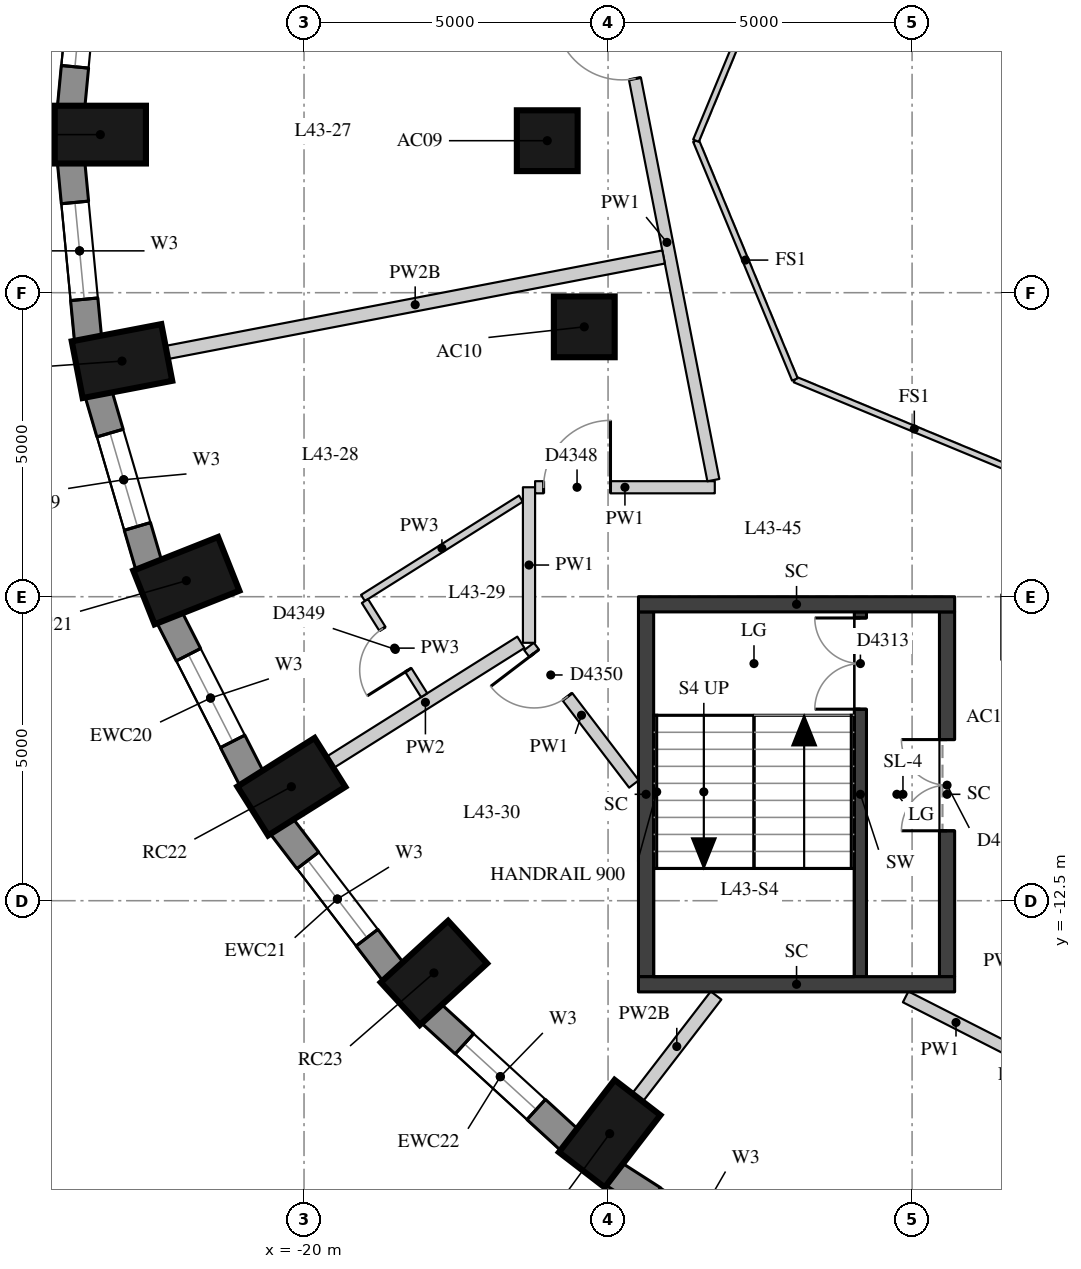
"""IFC4 building model, lengths in metres.
Left out: names, types, materials, properties, quantities, classifications, styles, units other than length and angle.
Written with IfcOpenShell. Run it as: python <this file> out.ifc"""

import sys

from ifc_helpers import new_model, si_unit, direction, frame, frame_2d, origin, origin_2d, place, context, subcontext, project, spatial, rectangle, extrude, element, fill, save


model = new_model("IFC4")
c1 = context("Model", 3, precision=1e-05, world=origin(), true_north=direction((0.0, 1.0)))
c2 = subcontext(c1, "Body", "Model", "MODEL_VIEW")
j1 = project(units=[si_unit("LENGTHUNIT", "METRE"), si_unit("PLANEANGLEUNIT", "RADIAN")], contexts=[c1])
p1 = place(None, origin())
s1 = spatial("IfcSite", under=j1, at=p1, CompositionType="ELEMENT")
p2 = place(p1, origin())
s2 = spatial("IfcBuilding", under=s1, at=p2, CompositionType="ELEMENT")
p3 = place(p2, frame((0.0, 0.0, 155.0)))
s3 = spatial("IfcBuildingStorey", under=s2, at=p3, CompositionType="ELEMENT", Elevation=155.0)
for number, where, z_axis, x_axis in (
    (1, (-23.35, 0.1, 0.0), (0.0, 0.0, 1.0), (-1.0, 0.0, 0.0)),
    (2, (-22.994, -3.625, 0.0), (0.0, 0.0, 1.0), (-0.982, -0.189, 0.0)),
    (3, (-21.936, -7.236, 0.0), (0.0, 0.0, 1.0), (-0.93, -0.369, 0.0)),
    (4, (-20.208, -10.625, 0.0), (0.0, 0.0, 1.0), (-0.846, -0.533, 0.0)),
    (5, (-17.864, -13.688, 0.0), (0.0, 0.0, 1.0), (-0.738, -0.675, 0.0)),
    (6, (-14.973, -16.332, 0.0), (0.0, 0.0, 1.0), (-0.61, -0.792, 0.0)),
):
    element("IfcColumn", number, at=place(p3, frame(where, z_axis=z_axis, x_axis=x_axis)), inside=s3, PredefinedType="COLUMN", context=c2, shape_type="SweptSolid", body=[
        extrude(rectangle(XDim=1.5, YDim=0.95, at=origin_2d()), origin(), (0.0, 0.0, 1.0), 3.3),
    ])
for number, where, z_axis, x_axis in (
    (7, (-16.0, 0.0, 0.0), (0.0, 0.0, 1.0), (1.0, 0.0, 0.0)),
    (8, (-15.391, -3.062, 0.0), (0.0, 0.0, 1.0), (1.0, 0.0, 0.0)),
):
    element("IfcColumn", number, at=place(p3, frame(where, z_axis=z_axis, x_axis=x_axis)), inside=s3, PredefinedType="COLUMN", context=c2, shape_type="SweptSolid", body=[
        extrude(rectangle(XDim=1.0, YDim=1.0, at=origin_2d()), origin(), (0.0, 0.0, 1.0), 3.3),
    ])
p4 = place(p3, frame((-23.552, 3.469, 0.0), z_axis=(0.0, 0.0, 1.0), x_axis=(-0.095265737322, -0.995451876935, 0.0)))
e9 = element("IfcWall", 9, at=p4, inside=s3, PredefinedType="SOLIDWALL", context=c2, shape_type="SweptSolid", body=[
    extrude(rectangle(XDim=2.927, YDim=0.45, at=frame_2d((1.463, 0.0))), origin(), (0.0, 0.0, 1.0), 3.02),
])
p5 = place(p4, frame((0.663, 0.0, 0.4)))
e10 = element("IfcOpeningElement", 10, at=p5, cuts=e9, PredefinedType="OPENING", context=c2, shape_type="SweptSolid", body=[
    extrude(rectangle(XDim=1.6, YDim=1.75, at=frame_2d((0.8, 0.875))), frame((0.0, 0.235, 0.0), z_axis=(0.0, -1.0, 0.0), x_axis=(1.0, 0.0, 0.0)), (0.0, 0.0, 1.0), 0.47),
])
p6 = place(p3, frame((-23.831, -0.355, 0.0), z_axis=(0.0, 0.0, 1.0), x_axis=(0.095257827044, -0.995452633924, 0.0)))
e11 = element("IfcWall", 11, at=p6, inside=s3, PredefinedType="SOLIDWALL", context=c2, shape_type="SweptSolid", body=[
    extrude(rectangle(XDim=2.927, YDim=0.45, at=frame_2d((1.463, 0.0))), origin(), (0.0, 0.0, 1.0), 3.02),
])
p7 = place(p6, frame((0.663, 0.0, 0.4)))
e12 = element("IfcOpeningElement", 12, at=p7, cuts=e11, PredefinedType="OPENING", context=c2, shape_type="SweptSolid", body=[
    extrude(rectangle(XDim=1.6, YDim=1.75, at=frame_2d((0.8, 0.875))), frame((0.0, 0.235, 0.0), z_axis=(0.0, -1.0, 0.0), x_axis=(1.0, 0.0, 0.0)), (0.0, 0.0, 1.0), 0.47),
])
p8 = place(p3, frame((-23.38, -4.162, 0.0), z_axis=(0.0, 0.0, 1.0), x_axis=(0.281125768296, -0.959670934435, 0.0)))
e13 = element("IfcWall", 13, at=p8, inside=s3, PredefinedType="SOLIDWALL", context=c2, shape_type="SweptSolid", body=[
    extrude(rectangle(XDim=2.948, YDim=0.45, at=frame_2d((1.474, 0.0))), origin(), (0.0, 0.0, 1.0), 3.02),
])
p9 = place(p8, frame((0.674, 0.0, 0.4)))
e14 = element("IfcOpeningElement", 14, at=p9, cuts=e13, PredefinedType="OPENING", context=c2, shape_type="SweptSolid", body=[
    extrude(rectangle(XDim=1.6, YDim=1.75, at=frame_2d((0.8, 0.875))), frame((0.0, 0.235, 0.0), z_axis=(0.0, -1.0, 0.0), x_axis=(1.0, 0.0, 0.0)), (0.0, 0.0, 1.0), 0.47),
])
p10 = place(p3, frame((-22.215, -7.837, 0.0), z_axis=(0.0, 0.0, 1.0), x_axis=(0.454133999889, -0.890933392653, 0.0)))
e15 = element("IfcWall", 15, at=p10, inside=s3, PredefinedType="SOLIDWALL", context=c2, shape_type="SweptSolid", body=[
    extrude(rectangle(XDim=2.986, YDim=0.45, at=frame_2d((1.493, 0.0))), origin(), (0.0, 0.0, 1.0), 3.02),
])
p11 = place(p10, frame((0.693, 0.0, 0.4)))
e16 = element("IfcOpeningElement", 16, at=p11, cuts=e15, PredefinedType="OPENING", context=c2, shape_type="SweptSolid", body=[
    extrude(rectangle(XDim=1.6, YDim=1.75, at=frame_2d((0.8, 0.875))), frame((0.0, 0.235, 0.0), z_axis=(0.0, -1.0, 0.0), x_axis=(1.0, 0.0, 0.0)), (0.0, 0.0, 1.0), 0.47),
])
p12 = place(p3, frame((-20.374, -11.267, 0.0), z_axis=(0.0, 0.0, 1.0), x_axis=(0.607817056371, -0.794077090706, 0.0)))
e17 = element("IfcWall", 17, at=p12, inside=s3, PredefinedType="SOLIDWALL", context=c2, shape_type="SweptSolid", body=[
    extrude(rectangle(XDim=3.037, YDim=0.45, at=frame_2d((1.519, 0.0))), origin(), (0.0, 0.0, 1.0), 3.02),
])
p13 = place(p12, frame((0.719, 0.0, 0.4)))
e18 = element("IfcOpeningElement", 18, at=p13, cuts=e17, PredefinedType="OPENING", context=c2, shape_type="SweptSolid", body=[
    extrude(rectangle(XDim=1.6, YDim=1.75, at=frame_2d((0.8, 0.875))), frame((0.0, 0.235, 0.0), z_axis=(0.0, -1.0, 0.0), x_axis=(1.0, 0.0, 0.0)), (0.0, 0.0, 1.0), 0.47),
])
p14 = place(p3, frame((-17.913, -14.35, 0.0), z_axis=(0.0, 0.0, 1.0), x_axis=(0.737808755941, -0.675009807082, 0.0)))
e19 = element("IfcWall", 19, at=p14, inside=s3, PredefinedType="SOLIDWALL", context=c2, shape_type="SweptSolid", body=[
    extrude(rectangle(XDim=3.094, YDim=0.45, at=frame_2d((1.547, 0.0))), origin(), (0.0, 0.0, 1.0), 3.02),
])
p15 = place(p14, frame((0.747, 0.0, 0.4)))
e20 = element("IfcOpeningElement", 20, at=p15, cuts=e19, PredefinedType="OPENING", context=c2, shape_type="SweptSolid", body=[
    extrude(rectangle(XDim=1.6, YDim=1.75, at=frame_2d((0.8, 0.875))), frame((0.0, 0.235, 0.0), z_axis=(0.0, -1.0, 0.0), x_axis=(1.0, 0.0, 0.0)), (0.0, 0.0, 1.0), 0.47),
])
p16 = place(p3, frame((-14.908, -16.993, 0.0), z_axis=(0.0, 0.0, 1.0), x_axis=(0.842065914439, -0.539374633943, 0.0)))
e21 = element("IfcWall", 21, at=p16, inside=s3, PredefinedType="SOLIDWALL", context=c2, shape_type="SweptSolid", body=[
    extrude(rectangle(XDim=3.151, YDim=0.45, at=frame_2d((1.576, 0.0))), origin(), (0.0, 0.0, 1.0), 3.02),
])
p17 = place(p16, frame((0.776, 0.0, 0.4)))
e22 = element("IfcOpeningElement", 22, at=p17, cuts=e21, PredefinedType="OPENING", context=c2, shape_type="SweptSolid", body=[
    extrude(rectangle(XDim=1.6, YDim=1.75, at=frame_2d((0.8, 0.875))), frame((0.0, 0.235, 0.0), z_axis=(0.0, -1.0, 0.0), x_axis=(1.0, 0.0, 0.0)), (0.0, 0.0, 1.0), 0.47),
])
p18 = place(p3, frame((-10.85, -13.75, 0.0), z_axis=(0.0, 0.0, 1.0), x_axis=(0.0, 1.0, 0.0)))
e23 = element("IfcWall", 23, at=p18, inside=s3, PredefinedType="SHEAR", context=c2, shape_type="SweptSolid", body=[
    extrude(rectangle(XDim=6.0, YDim=0.2, at=frame_2d((3.0, 0.0))), origin(), (0.0, 0.0, 1.0), 3.02),
])
p19 = place(p18, frame((4.4, 0.0, 0.0)))
e24 = element("IfcOpeningElement", 24, at=p19, cuts=e23, PredefinedType="OPENING", context=c2, shape_type="SweptSolid", body=[
    extrude(rectangle(XDim=1.5, YDim=2.1, at=frame_2d((0.75, 1.05))), frame((0.0, 0.11, 0.0), z_axis=(0.0, -1.0, 0.0), x_axis=(1.0, 0.0, 0.0)), (0.0, 0.0, 1.0), 0.22),
])
p20 = place(p3, frame((-14.375, -13.75, -0.28), z_axis=(0.0, 0.0, 1.0), x_axis=(0.0, 1.0, 0.0)))
e25 = element("IfcWall", 25, at=p20, inside=s3, PredefinedType="SHEAR", context=c2, shape_type="SweptSolid", body=[
    extrude(rectangle(XDim=6.0, YDim=0.25, at=frame_2d((3.0, 0.0))), origin(), (0.0, 0.0, 1.0), 3.3),
])
p21 = place(p3, frame((-9.425, -13.75, -0.28), z_axis=(0.0, 0.0, 1.0), x_axis=(0.0, 1.0, 0.0)))
e26 = element("IfcWall", 26, at=p21, inside=s3, PredefinedType="SHEAR", context=c2, shape_type="SweptSolid", body=[
    extrude(rectangle(XDim=6.0, YDim=0.25, at=frame_2d((3.0, 0.0))), origin(), (0.0, 0.0, 1.0), 3.3),
])
p22 = place(p21, frame((2.4, 0.0, 0.28)))
e27 = element("IfcOpeningElement", 27, at=p22, cuts=e26, PredefinedType="OPENING", context=c2, shape_type="SweptSolid", body=[
    extrude(rectangle(XDim=1.5, YDim=2.1, at=frame_2d((0.75, 1.05))), frame((0.0, 0.135, 0.0), z_axis=(0.0, -1.0, 0.0), x_axis=(1.0, 0.0, 0.0)), (0.0, 0.0, 1.0), 0.27),
])
for number, where, z_axis, x_axis in (
    (28, (-14.5, -7.625, -0.28), (0.0, 0.0, 1.0), (1.0, 0.0, 0.0)),
    (29, (-14.5, -13.875, -0.28), (0.0, 0.0, 1.0), (1.0, 0.0, 0.0)),
):
    element("IfcWall", number, at=place(p3, frame(where, z_axis=z_axis, x_axis=x_axis)), inside=s3, PredefinedType="SHEAR", context=c2, shape_type="SweptSolid", body=[
        extrude(rectangle(XDim=5.2, YDim=0.25, at=frame_2d((2.6, 0.0))), origin(), (0.0, 0.0, 1.0), 3.3),
    ])
p23 = place(p3, frame((-8.449, -14.925, 0.0), z_axis=(0.0, 0.0, 1.0), x_axis=(-0.891172770552, 0.45366407509, 0.0)))
e30 = element("IfcWall", 30, at=p23, inside=s3, PredefinedType="PARTITIONING", context=c2, shape_type="SweptSolid", body=[
    extrude(rectangle(XDim=1.859, YDim=0.2, at=frame_2d((0.929, 0.0))), origin(), (0.0, 0.0, 1.0), 3.02),
])
p24 = place(p3, frame((-14.574, -10.58, 0.0), z_axis=(0.0, 0.0, 1.0), x_axis=(-0.606733250298, 0.794905505694, 0.0)))
e31 = element("IfcWall", 31, at=p24, inside=s3, PredefinedType="PARTITIONING", context=c2, shape_type="SweptSolid", body=[
    extrude(rectangle(XDim=2.845, YDim=0.2, at=frame_2d((1.423, 0.0))), origin(), (0.0, 0.0, 1.0), 3.02),
])
p25 = place(p24, frame((1.805, 0.0, 0.0)))
e32 = element("IfcOpeningElement", 32, at=p25, cuts=e31, PredefinedType="OPENING", context=c2, shape_type="SweptSolid", body=[
    extrude(rectangle(XDim=0.9, YDim=2.1, at=frame_2d((0.45, 1.05))), frame((0.0, 0.11, 0.0), z_axis=(0.0, -1.0, 0.0), x_axis=(1.0, 0.0, 0.0)), (0.0, 0.0, 1.0), 0.22),
])
p26 = place(p3, frame((-16.3, -8.258, 0.0), z_axis=(0.0, 0.0, 1.0), x_axis=(0.0, 1.0, 0.0)))
e33 = element("IfcWall", 33, at=p26, inside=s3, PredefinedType="PARTITIONING", context=c2, shape_type="SweptSolid", body=[
    extrude(rectangle(XDim=2.558, YDim=0.2, at=frame_2d((1.279, 0.0))), origin(), (0.0, 0.0, 1.0), 3.02),
])
p27 = place(p3, frame((-16.2, -5.7, 0.0), z_axis=(0.0, 0.0, 1.0), x_axis=(1.0, 0.0, 0.0)))
e34 = element("IfcWall", 34, at=p27, inside=s3, PredefinedType="PARTITIONING", context=c2, shape_type="SweptSolid", body=[
    extrude(rectangle(XDim=2.955, YDim=0.2, at=frame_2d((1.478, 0.0))), origin(), (0.0, 0.0, 1.0), 3.02),
])
p28 = place(p27, frame((0.14, 0.0, 0.0)))
e35 = element("IfcOpeningElement", 35, at=p28, cuts=e34, PredefinedType="OPENING", context=c2, shape_type="SweptSolid", body=[
    extrude(rectangle(XDim=1.1, YDim=2.1, at=frame_2d((0.55, 1.05))), frame((0.0, 0.11, 0.0), z_axis=(0.0, -1.0, 0.0), x_axis=(1.0, 0.0, 0.0)), (0.0, 0.0, 1.0), 0.22),
])
p29 = place(p3, frame((-13.268, -5.583, 0.0), z_axis=(0.0, 0.0, 1.0), x_axis=(-0.191747927029, 0.981444207523, 0.0)))
e36 = element("IfcWall", 36, at=p29, inside=s3, PredefinedType="PARTITIONING", context=c2, shape_type="SweptSolid", body=[
    extrude(rectangle(XDim=7.968, YDim=0.2, at=frame_2d((3.984, 0.0))), origin(), (0.0, 0.0, 1.0), 3.02),
])
p30 = place(p29, frame((6.728, 0.0, 0.0)))
e37 = element("IfcOpeningElement", 37, at=p30, cuts=e36, PredefinedType="OPENING", context=c2, shape_type="SweptSolid", body=[
    extrude(rectangle(XDim=1.1, YDim=2.1, at=frame_2d((0.55, 1.05))), frame((0.0, 0.11, 0.0), z_axis=(0.0, -1.0, 0.0), x_axis=(1.0, 0.0, 0.0)), (0.0, 0.0, 1.0), 0.22),
])
p31 = place(p3, frame((-22.257, -3.483, 0.0), z_axis=(0.0, 0.0, 1.0), x_axis=(0.982022559039, 0.188763591666, 0.0)))
e38 = element("IfcWall", 38, at=p31, inside=s3, PredefinedType="PARTITIONING", context=c2, shape_type="SweptSolid", body=[
    extrude(rectangle(XDim=8.32, YDim=0.22, at=frame_2d((4.16, 0.0))), origin(), (0.0, 0.0, 1.0), 2.57),
])
p32 = place(p3, frame((-19.573, -10.226, 0.0), z_axis=(0.0, 0.0, 1.0), x_axis=(0.846352613514, 0.53262299387, 0.0)))
e39 = element("IfcWall", 39, at=p32, inside=s3, PredefinedType="PARTITIONING", context=c2, shape_type="SweptSolid", body=[
    extrude(rectangle(XDim=3.71, YDim=0.22, at=frame_2d((1.855, 0.0))), origin(), (0.0, 0.0, 1.0), 3.02),
])
p33 = place(p3, frame((-14.516, -15.737, 0.0), z_axis=(0.0, 0.0, 1.0), x_axis=(0.609983624648, 0.792414019097, 0.0)))
e40 = element("IfcWall", 40, at=p33, inside=s3, PredefinedType="PARTITIONING", context=c2, shape_type="SweptSolid", body=[
    extrude(rectangle(XDim=2.118, YDim=0.22, at=frame_2d((1.059, 0.0))), origin(), (0.0, 0.0, 1.0), 2.57),
])
p34 = place(p3, frame((-16.434, -5.887, 0.0), z_axis=(0.0, 0.0, 1.0), x_axis=(-0.846389599206, -0.532564218058, 0.0)))
e41 = element("IfcWall", 41, at=p34, inside=s3, PredefinedType="PARTITIONING", context=c2, shape_type="SweptSolid", body=[
    extrude(rectangle(XDim=3.068, YDim=0.12, at=frame_2d((1.534, 0.0))), origin(), (0.0, 0.0, 1.0), 3.02),
])
p35 = place(p3, frame((-18.999, -7.571, 0.0), z_axis=(0.0, 0.0, 1.0), x_axis=(0.532431076319, -0.84647335987, 0.0)))
e42 = element("IfcWall", 42, at=p35, inside=s3, PredefinedType="PARTITIONING", context=c2, shape_type="SweptSolid", body=[
    extrude(rectangle(XDim=1.83, YDim=0.12, at=frame_2d((0.915, 0.0))), origin(), (0.0, 0.0, 1.0), 3.02),
])
p36 = place(p35, frame((0.54, 0.0, 0.0)))
e43 = element("IfcOpeningElement", 43, at=p36, cuts=e42, PredefinedType="OPENING", context=c2, shape_type="SweptSolid", body=[
    extrude(rectangle(XDim=0.8, YDim=2.1, at=frame_2d((0.4, 1.05))), frame((0.0, 0.07, 0.0), z_axis=(0.0, -1.0, 0.0), x_axis=(1.0, 0.0, 0.0)), (0.0, 0.0, 1.0), 0.14),
])
for number, where, z_axis, x_axis in (
    (44, (-8.0, -5.554, 0.0), (0.0, 0.0, 1.0), (-0.924, 0.383, 0.0)),
    (45, (-11.927, -3.927, 0.0), (0.0, 0.0, 1.0), (-0.383, 0.924, 0.0)),
    (46, (-13.554, 0.0, 0.0), (0.0, 0.0, 1.0), (0.383, 0.924, 0.0)),
):
    element("IfcWall", number, at=place(p3, frame(where, z_axis=z_axis, x_axis=x_axis)), inside=s3, PredefinedType="PARTITIONING", context=c2, shape_type="SweptSolid", body=[
        extrude(rectangle(XDim=4.251, YDim=0.1, at=frame_2d((2.125, 0.0))), origin(), (0.0, 0.0, 1.0), 3.02),
    ])
p37 = place(p5, origin())
e47 = element("IfcWindow", 47, at=p37, inside=s3, PartitioningType="SINGLE_PANEL", PredefinedType="WINDOW", context=c2, shape_type="SweptSolid", body=[
    extrude(rectangle(XDim=1.6, YDim=1.75, at=frame_2d((0.8, 0.875))), frame((0.0, 0.035, 0.0), z_axis=(0.0, -1.0, 0.0), x_axis=(1.0, 0.0, 0.0)), (0.0, 0.0, 1.0), 0.06),
])
fill(e10, e47)
p38 = place(p7, origin())
e48 = element("IfcWindow", 48, at=p38, inside=s3, PartitioningType="SINGLE_PANEL", PredefinedType="WINDOW", context=c2, shape_type="SweptSolid", body=[
    extrude(rectangle(XDim=1.6, YDim=1.75, at=frame_2d((0.8, 0.875))), frame((0.0, 0.035, 0.0), z_axis=(0.0, -1.0, 0.0), x_axis=(1.0, 0.0, 0.0)), (0.0, 0.0, 1.0), 0.06),
])
fill(e12, e48)
p39 = place(p9, origin())
e49 = element("IfcWindow", 49, at=p39, inside=s3, PartitioningType="SINGLE_PANEL", PredefinedType="WINDOW", context=c2, shape_type="SweptSolid", body=[
    extrude(rectangle(XDim=1.6, YDim=1.75, at=frame_2d((0.8, 0.875))), frame((0.0, 0.035, 0.0), z_axis=(0.0, -1.0, 0.0), x_axis=(1.0, 0.0, 0.0)), (0.0, 0.0, 1.0), 0.06),
])
fill(e14, e49)
p40 = place(p11, origin())
e50 = element("IfcWindow", 50, at=p40, inside=s3, PartitioningType="SINGLE_PANEL", PredefinedType="WINDOW", context=c2, shape_type="SweptSolid", body=[
    extrude(rectangle(XDim=1.6, YDim=1.75, at=frame_2d((0.8, 0.875))), frame((0.0, 0.035, 0.0), z_axis=(0.0, -1.0, 0.0), x_axis=(1.0, 0.0, 0.0)), (0.0, 0.0, 1.0), 0.06),
])
fill(e16, e50)
p41 = place(p13, origin())
e51 = element("IfcWindow", 51, at=p41, inside=s3, PartitioningType="SINGLE_PANEL", PredefinedType="WINDOW", context=c2, shape_type="SweptSolid", body=[
    extrude(rectangle(XDim=1.6, YDim=1.75, at=frame_2d((0.8, 0.875))), frame((0.0, 0.035, 0.0), z_axis=(0.0, -1.0, 0.0), x_axis=(1.0, 0.0, 0.0)), (0.0, 0.0, 1.0), 0.06),
])
fill(e18, e51)
p42 = place(p15, origin())
e52 = element("IfcWindow", 52, at=p42, inside=s3, PartitioningType="SINGLE_PANEL", PredefinedType="WINDOW", context=c2, shape_type="SweptSolid", body=[
    extrude(rectangle(XDim=1.6, YDim=1.75, at=frame_2d((0.8, 0.875))), frame((0.0, 0.035, 0.0), z_axis=(0.0, -1.0, 0.0), x_axis=(1.0, 0.0, 0.0)), (0.0, 0.0, 1.0), 0.06),
])
fill(e20, e52)
p43 = place(p19, origin())
e53 = element("IfcDoor", 53, at=p43, inside=s3, OperationType="DOUBLE_DOOR_SINGLE_SWING", PredefinedType="DOOR", context=c2, shape_type="SweptSolid", body=[
    extrude(rectangle(XDim=1.5, YDim=2.1, at=frame_2d((0.75, 1.05))), frame((0.0, 0.025, 0.0), z_axis=(0.0, -1.0, 0.0), x_axis=(1.0, 0.0, 0.0)), (0.0, 0.0, 1.0), 0.05),
])
fill(e24, e53)
p44 = place(p22, origin())
e54 = element("IfcDoor", 54, at=p44, inside=s3, OperationType="DOUBLE_DOOR_SINGLE_SWING", PredefinedType="DOOR", context=c2, shape_type="SweptSolid", body=[
    extrude(rectangle(XDim=1.5, YDim=2.1, at=frame_2d((0.75, 1.05))), frame((0.0, 0.025, 0.0), z_axis=(0.0, -1.0, 0.0), x_axis=(1.0, 0.0, 0.0)), (0.0, 0.0, 1.0), 0.05),
])
fill(e27, e54)
p45 = place(p30, origin())
e55 = element("IfcDoor", 55, at=p45, inside=s3, OperationType="SINGLE_SWING_RIGHT", PredefinedType="DOOR", context=c2, shape_type="SweptSolid", body=[
    extrude(rectangle(XDim=1.1, YDim=2.1, at=frame_2d((0.55, 1.05))), frame((0.0, 0.025, 0.0), z_axis=(0.0, -1.0, 0.0), x_axis=(1.0, 0.0, 0.0)), (0.0, 0.0, 1.0), 0.05),
])
fill(e37, e55)
p46 = place(p28, origin())
e56 = element("IfcDoor", 56, at=p46, inside=s3, OperationType="SINGLE_SWING_RIGHT", PredefinedType="DOOR", context=c2, shape_type="SweptSolid", body=[
    extrude(rectangle(XDim=1.1, YDim=2.1, at=frame_2d((0.55, 1.05))), frame((0.0, 0.025, 0.0), z_axis=(0.0, -1.0, 0.0), x_axis=(1.0, 0.0, 0.0)), (0.0, 0.0, 1.0), 0.05),
])
fill(e35, e56)
p47 = place(p36, origin())
e57 = element("IfcDoor", 57, at=p47, inside=s3, OperationType="SINGLE_SWING_LEFT", PredefinedType="DOOR", context=c2, shape_type="SweptSolid", body=[
    extrude(rectangle(XDim=0.8, YDim=2.1, at=frame_2d((0.4, 1.05))), frame((0.0, 0.025, 0.0), z_axis=(0.0, -1.0, 0.0), x_axis=(1.0, 0.0, 0.0)), (0.0, 0.0, 1.0), 0.05),
])
fill(e43, e57)
p48 = place(p25, origin())
e58 = element("IfcDoor", 58, at=p48, inside=s3, OperationType="SINGLE_SWING_RIGHT", PredefinedType="DOOR", context=c2, shape_type="SweptSolid", body=[
    extrude(rectangle(XDim=0.9, YDim=2.1, at=frame_2d((0.45, 1.05))), frame((0.0, 0.025, 0.0), z_axis=(0.0, -1.0, 0.0), x_axis=(1.0, 0.0, 0.0)), (0.0, 0.0, 1.0), 0.05),
])
fill(e32, e58)
save(model, sys.argv[1])
